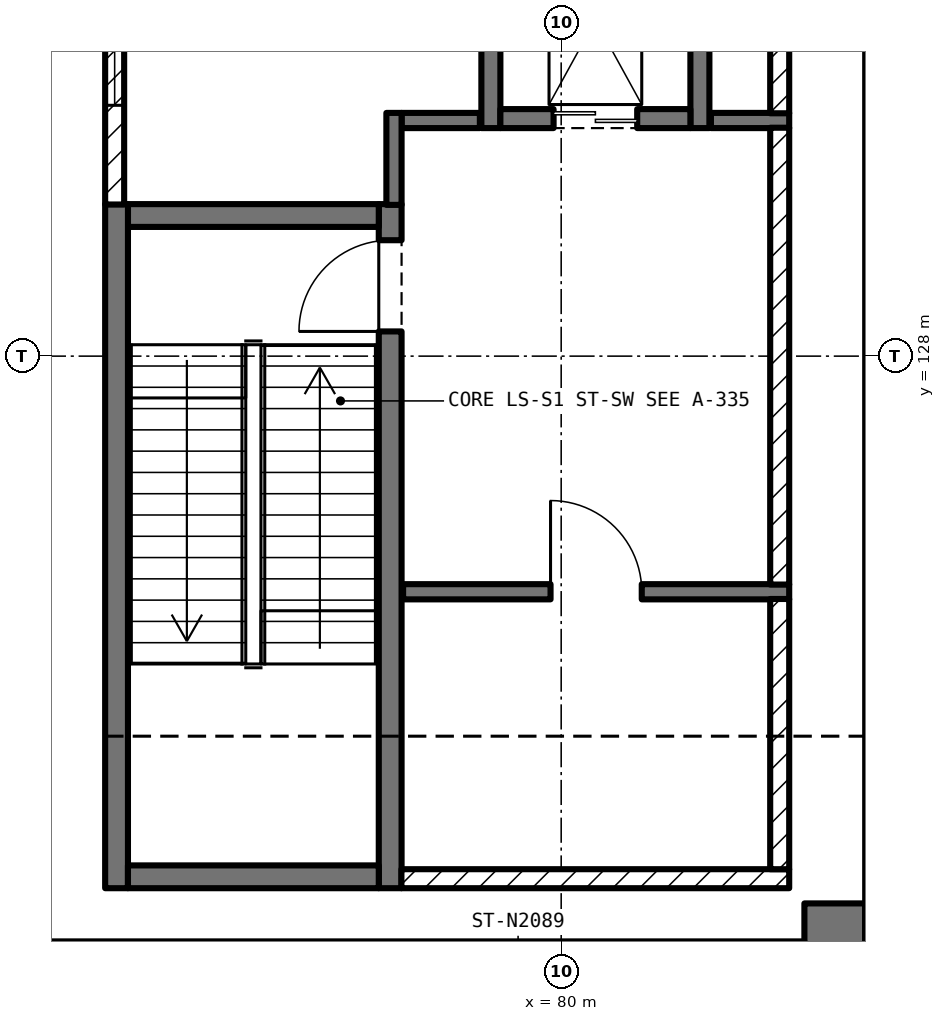
"""IFC4 building model, lengths in metres.
Left out: names, types, materials, properties, quantities, classifications, styles, units other than length and angle.
Written with IfcOpenShell. Run it as: python <this file> out.ifc"""

import sys

from ifc_helpers import new_model, si_unit, direction, frame, frame_2d, origin, place, context, subcontext, project, spatial, rectangle, extrude, element, fill, save


model = new_model("IFC4")
c1 = context("Model", 3, precision=1e-05, world=origin(), true_north=direction((0.0, 1.0)))
c2 = subcontext(c1, "Body", "Model", "MODEL_VIEW")
j1 = project(units=[si_unit("LENGTHUNIT", "METRE"), si_unit("PLANEANGLEUNIT", "RADIAN")], contexts=[c1])
p1 = place(None, origin())
s1 = spatial("IfcSite", under=j1, at=p1, CompositionType="ELEMENT")
p2 = place(p1, origin())
s2 = spatial("IfcBuilding", under=s1, at=p2, CompositionType="ELEMENT")
p3 = place(p2, frame((0.0, 0.0, 11.5)))
s3 = spatial("IfcBuildingStorey", under=s2, at=p3, CompositionType="ELEMENT", Elevation=11.5)
p4 = place(p3, frame((83.6, 116.0, 0.0), z_axis=(0.0, 0.0, 1.0), x_axis=(0.0, 1.0, 0.0)))
e1 = element("IfcWall", 1, at=p4, inside=s3, PredefinedType="SHEAR", context=c2, shape_type="SweptSolid", body=[
    extrude(rectangle(XDim=4.8, YDim=0.8, at=frame_2d((2.4, 0.0))), origin(), (0.0, 0.0, 1.0), 5.5),
])
p5 = place(p3, frame((77.75, 121.0, 0.0), z_axis=(0.0, 0.0, 1.0), x_axis=(0.0, 1.0, 0.0)))
e2 = element("IfcWall", 2, at=p5, inside=s3, PredefinedType="SOLIDWALL", context=c2, shape_type="SweptSolid", body=[
    extrude(rectangle(XDim=9.0, YDim=0.3, at=frame_2d((4.5, 0.0))), origin(), (0.0, 0.0, 1.0), 5.5),
])
p6 = place(p5, frame((7.325, 0.0, 0.0)))
e3 = element("IfcOpeningElement", 3, at=p6, cuts=e2, PredefinedType="OPENING", context=c2, shape_type="SweptSolid", body=[
    extrude(rectangle(XDim=1.2, YDim=2.1, at=frame_2d((0.6, 1.05))), frame((0.0, 0.162, 0.0), z_axis=(0.0, -1.0, 0.0), x_axis=(1.0, 0.0, 0.0)), (0.0, 0.0, 1.0), 0.324),
])
p7 = place(p3, frame((77.6, 129.85, 0.0), z_axis=(0.0, 0.0, 1.0), x_axis=(-1.0, 0.0, 0.0)))
e4 = element("IfcWall", 4, at=p7, inside=s3, PredefinedType="SOLIDWALL", context=c2, shape_type="SweptSolid", body=[
    extrude(rectangle(XDim=3.3, YDim=0.3, at=frame_2d((1.65, 0.0))), origin(), (0.0, 0.0, 1.0), 5.5),
])
p8 = place(p3, frame((74.15, 130.0, 0.0), z_axis=(0.0, 0.0, 1.0), x_axis=(0.0, -1.0, 0.0)))
e5 = element("IfcWall", 5, at=p8, inside=s3, PredefinedType="SOLIDWALL", context=c2, shape_type="SweptSolid", body=[
    extrude(rectangle(XDim=9.0, YDim=0.3, at=frame_2d((4.5, 0.0))), origin(), (0.0, 0.0, 1.0), 5.5),
])
p9 = place(p3, frame((74.3, 121.15, 0.0), z_axis=(0.0, 0.0, 1.0), x_axis=(1.0, 0.0, 0.0)))
e6 = element("IfcWall", 6, at=p9, inside=s3, PredefinedType="SOLIDWALL", context=c2, shape_type="SweptSolid", body=[
    extrude(rectangle(XDim=3.3, YDim=0.3, at=frame_2d((1.65, 0.0))), origin(), (0.0, 0.0, 1.0), 5.5),
])
for number, where, z_axis, x_axis in (
    (7, (81.825, 131.0, 0.0), (0.0, 0.0, 1.0), (0.0, 1.0, 0.0)),
    (8, (79.075, 135.0, 0.0), (0.0, 0.0, 1.0), (0.0, -1.0, 0.0)),
):
    element("IfcWall", number, at=place(p3, frame(where, z_axis=z_axis, x_axis=x_axis)), inside=s3, PredefinedType="SOLIDWALL", context=c2, shape_type="SweptSolid", body=[
        extrude(rectangle(XDim=4.0, YDim=0.25, at=frame_2d((2.0, 0.0))), origin(), (0.0, 0.0, 1.0), 5.5),
    ])
p10 = place(p3, frame((79.2, 131.125, 0.0), z_axis=(0.0, 0.0, 1.0), x_axis=(1.0, 0.0, 0.0)))
e9 = element("IfcWall", 9, at=p10, inside=s3, PredefinedType="SOLIDWALL", context=c2, shape_type="SweptSolid", body=[
    extrude(rectangle(XDim=2.5, YDim=0.25, at=frame_2d((1.25, 0.0))), origin(), (0.0, 0.0, 1.0), 5.5),
])
p11 = place(p10, frame((0.7, 0.0, 0.0)))
e10 = element("IfcOpeningElement", 10, at=p11, cuts=e9, PredefinedType="OPENING", context=c2, shape_type="SweptSolid", body=[
    extrude(rectangle(XDim=1.1, YDim=2.1, at=frame_2d((0.55, 1.05))), frame((0.0, 0.137, 0.0), z_axis=(0.0, -1.0, 0.0), x_axis=(1.0, 0.0, 0.0)), (0.0, 0.0, 1.0), 0.274),
])
for number, where, z_axis, x_axis in (
    (11, (83.0, 131.1, 0.0), (0.0, 0.0, 1.0), (-1.0, 0.0, 0.0)),
    (12, (78.93, 131.1, 0.0), (0.0, 0.0, 1.0), (-1.0, 0.0, 0.0)),
):
    element("IfcWall", number, at=place(p3, frame(where, z_axis=z_axis, x_axis=x_axis)), inside=s3, PredefinedType="PARTITIONING", context=c2, shape_type="SweptSolid", body=[
        extrude(rectangle(XDim=1.03, YDim=0.2, at=frame_2d((0.515, 0.0))), origin(), (0.0, 0.0, 1.0), 5.28),
    ])
p12 = place(p3, frame((77.8, 131.2, 0.0), z_axis=(0.0, 0.0, 1.0), x_axis=(0.0, -1.0, 0.0)))
e13 = element("IfcWall", 13, at=p12, inside=s3, PredefinedType="PARTITIONING", context=c2, shape_type="SweptSolid", body=[
    extrude(rectangle(XDim=1.21, YDim=0.2, at=frame_2d((0.605, 0.0))), origin(), (0.0, 0.0, 1.0), 5.28),
])
p13 = place(p3, frame((77.92, 124.9, 0.0), z_axis=(0.0, 0.0, 1.0), x_axis=(1.0, 0.0, 0.0)))
e14 = element("IfcWall", 14, at=p13, inside=s3, PredefinedType="PARTITIONING", context=c2, shape_type="SweptSolid", body=[
    extrude(rectangle(XDim=5.08, YDim=0.2, at=frame_2d((2.54, 0.0))), origin(), (0.0, 0.0, 1.0), 5.28),
])
p14 = place(p13, frame((1.94, 0.0, 0.0)))
e15 = element("IfcOpeningElement", 15, at=p14, cuts=e14, PredefinedType="OPENING", context=c2, shape_type="SweptSolid", body=[
    extrude(rectangle(XDim=1.2, YDim=2.1, at=frame_2d((0.6, 1.05))), frame((0.0, 0.112, 0.0), z_axis=(0.0, -1.0, 0.0), x_axis=(1.0, 0.0, 0.0)), (0.0, 0.0, 1.0), 0.224),
])
p15 = place(p3, frame((74.125, 134.75, 0.0), z_axis=(0.0, 0.0, 1.0), x_axis=(0.0, -1.0, 0.0)))
e16 = element("IfcWall", 16, at=p15, inside=s3, PredefinedType="SOLIDWALL", context=c2, shape_type="SweptSolid", body=[
    extrude(rectangle(XDim=4.755, YDim=0.25, at=frame_2d((2.377, 0.0))), origin(), (0.0, 0.0, 1.0), 5.28),
])
p16 = place(p15, frame((1.05, 0.0, 2.6)))
e17 = element("IfcOpeningElement", 17, at=p16, cuts=e16, PredefinedType="OPENING", context=c2, shape_type="SweptSolid", body=[
    extrude(rectangle(XDim=2.4, YDim=1.2, at=frame_2d((1.2, 0.6))), frame((0.0, 0.137, 0.0), z_axis=(0.0, -1.0, 0.0), x_axis=(1.0, 0.0, 0.0)), (0.0, 0.0, 1.0), 0.274),
])
p17 = place(p3, frame((77.898, 121.125, 0.0), z_axis=(0.0, 0.0, 1.0), x_axis=(1.0, 0.0, 0.0)))
e18 = element("IfcWall", 18, at=p17, inside=s3, PredefinedType="SOLIDWALL", context=c2, shape_type="SweptSolid", body=[
    extrude(rectangle(XDim=5.102, YDim=0.25, at=frame_2d((2.551, 0.0))), origin(), (0.0, 0.0, 1.0), 5.28),
])
p18 = place(p3, frame((82.875, 121.25, 0.0), z_axis=(0.0, 0.0, 1.0), x_axis=(0.0, 1.0, 0.0)))
e19 = element("IfcWall", 19, at=p18, inside=s3, PredefinedType="SOLIDWALL", context=c2, shape_type="SweptSolid", body=[
    extrude(rectangle(XDim=3.555, YDim=0.25, at=frame_2d((1.777, 0.0))), origin(), (0.0, 0.0, 1.0), 5.28),
])
p19 = place(p3, frame((82.875, 124.995, 0.0), z_axis=(0.0, 0.0, 1.0), x_axis=(0.0, 1.0, 0.0)))
e20 = element("IfcWall", 20, at=p19, inside=s3, PredefinedType="SOLIDWALL", context=c2, shape_type="SweptSolid", body=[
    extrude(rectangle(XDim=6.01, YDim=0.25, at=frame_2d((3.005, 0.0))), origin(), (0.0, 0.0, 1.0), 5.28),
])
p20 = place(p3, frame((82.875, 131.195, 0.0), z_axis=(0.0, 0.0, 1.0), x_axis=(0.0, 1.0, 0.0)))
e21 = element("IfcWall", 21, at=p20, inside=s3, PredefinedType="SOLIDWALL", context=c2, shape_type="SweptSolid", body=[
    extrude(rectangle(XDim=3.805, YDim=0.25, at=frame_2d((1.902, 0.0))), origin(), (0.0, 0.0, 1.0), 5.28),
])
p21 = place(p6, origin())
e22 = element("IfcDoor", 22, at=p21, inside=s3, OperationType="SINGLE_SWING_LEFT", PredefinedType="DOOR", context=c2, shape_type="SweptSolid", body=[
    extrude(rectangle(XDim=1.2, YDim=2.1, at=frame_2d((0.6, 1.05))), frame((0.0, 0.025, 0.0), z_axis=(0.0, -1.0, 0.0), x_axis=(1.0, 0.0, 0.0)), (0.0, 0.0, 1.0), 0.05),
])
fill(e3, e22)
p22 = place(p11, origin())
e23 = element("IfcDoor", 23, at=p22, inside=s3, OperationType="DOUBLE_DOOR_SLIDING", PredefinedType="DOOR", context=c2, shape_type="SweptSolid", body=[
    extrude(rectangle(XDim=1.1, YDim=2.1, at=frame_2d((0.55, 1.05))), frame((0.0, 0.025, 0.0), z_axis=(0.0, -1.0, 0.0), x_axis=(1.0, 0.0, 0.0)), (0.0, 0.0, 1.0), 0.05),
])
fill(e10, e23)
p23 = place(p14, origin())
e24 = element("IfcDoor", 24, at=p23, inside=s3, OperationType="SINGLE_SWING_LEFT", PredefinedType="DOOR", context=c2, shape_type="SweptSolid", body=[
    extrude(rectangle(XDim=1.2, YDim=2.1, at=frame_2d((0.6, 1.05))), frame((0.0, 0.025, 0.0), z_axis=(0.0, -1.0, 0.0), x_axis=(1.0, 0.0, 0.0)), (0.0, 0.0, 1.0), 0.05),
])
fill(e15, e24)
p24 = place(p16, origin())
e25 = element("IfcWindow", 25, at=p24, inside=s3, PartitioningType="SINGLE_PANEL", PredefinedType="WINDOW", context=c2, shape_type="SweptSolid", body=[
    extrude(rectangle(XDim=2.4, YDim=1.2, at=frame_2d((1.2, 0.6))), frame((0.0, 0.03, 0.0), z_axis=(0.0, -1.0, 0.0), x_axis=(1.0, 0.0, 0.0)), (0.0, 0.0, 1.0), 0.06),
])
fill(e17, e25)
save(model, sys.argv[1])
